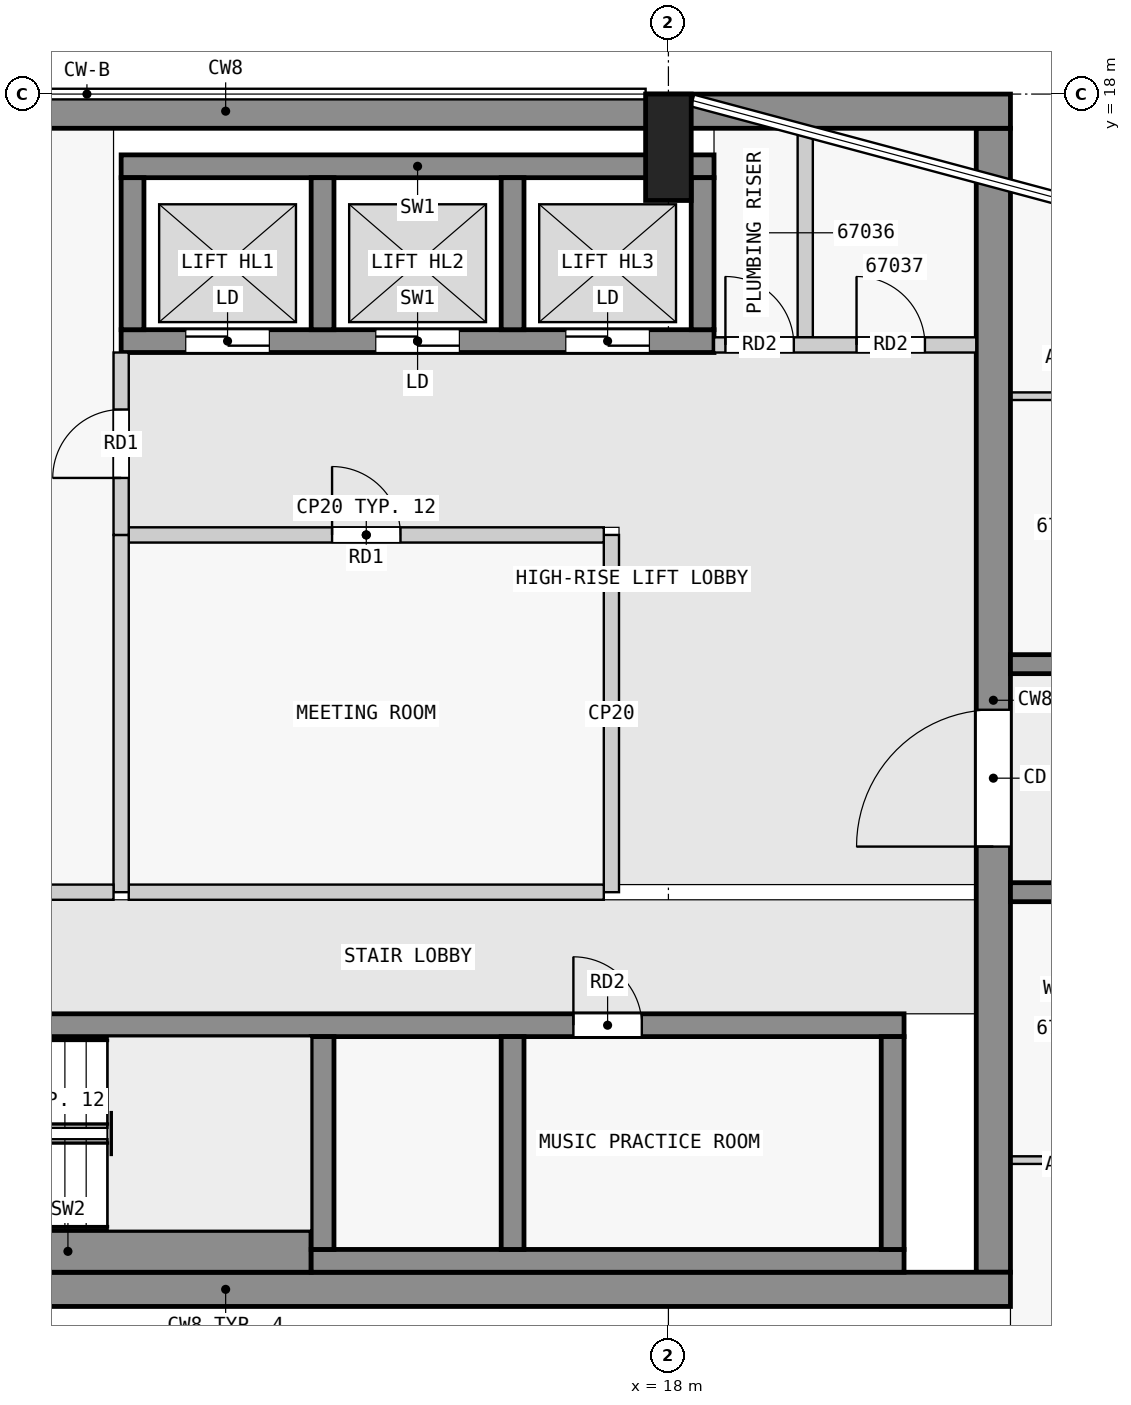
"""IFC4 building model, lengths in metres.
Left out: names, types, materials, properties, quantities, classifications, styles, units other than length and angle.
Written with IfcOpenShell. Run it as: python <this file> out.ifc"""

import sys

from ifc_helpers import new_model, si_unit, direction, frame, frame_2d, origin, origin_2d, place, context, subcontext, project, spatial, rectangle, extrude, element, fill, save


model = new_model("IFC4")
c1 = context("Model", 3, precision=1e-05, world=origin(), true_north=direction((0.0, 1.0)))
c2 = subcontext(c1, "Body", "Model", "MODEL_VIEW")
j1 = project(units=[si_unit("LENGTHUNIT", "METRE"), si_unit("PLANEANGLEUNIT", "RADIAN")], contexts=[c1])
p1 = place(None, origin())
s1 = spatial("IfcSite", under=j1, at=p1, CompositionType="ELEMENT")
p2 = place(p1, origin())
s2 = spatial("IfcBuilding", under=s1, at=p2, CompositionType="ELEMENT")
p3 = place(p2, frame((0.0, 0.0, 256.4)))
s3 = spatial("IfcBuildingStorey", under=s2, at=p3, CompositionType="ELEMENT", Elevation=256.4)
p4 = place(p3, frame((18.0, 17.3, 0.0), z_axis=(0.0, 0.0, 1.0), x_axis=(1.0, 0.0, 0.0)))
e1 = element("IfcColumn", 1, at=p4, inside=s3, PredefinedType="COLUMN", context=c2, shape_type="SweptSolid", body=[
    extrude(rectangle(XDim=0.6, YDim=1.4, at=origin_2d()), origin(), (0.0, 0.0, 1.0), 3.5),
])
for number, where, z_axis, x_axis in (
    (2, (1.85, 2.275, 0.0), (0.0, 0.0, 1.0), (1.0, 0.0, 0.0)),
    (3, (1.85, 17.775, 0.0), (0.0, 0.0, 1.0), (1.0, 0.0, 0.0)),
):
    element("IfcWall", number, at=place(p3, frame(where, z_axis=z_axis, x_axis=x_axis)), inside=s3, PredefinedType="SHEAR", context=c2, shape_type="SweptSolid", body=[
        extrude(rectangle(XDim=20.65, YDim=0.45, at=frame_2d((10.325, 0.0))), origin(), (0.0, 0.0, 1.0), 3.25),
    ])
p5 = place(p3, frame((22.275, 2.5, 0.0), z_axis=(0.0, 0.0, 1.0), x_axis=(0.0, 1.0, 0.0)))
e4 = element("IfcWall", 4, at=p5, inside=s3, PredefinedType="SHEAR", context=c2, shape_type="SweptSolid", body=[
    extrude(rectangle(XDim=15.05, YDim=0.45, at=frame_2d((7.525, 0.0))), origin(), (0.0, 0.0, 1.0), 3.25),
])
p6 = place(p5, frame((5.6, 0.0, 0.0)))
e5 = element("IfcOpeningElement", 5, at=p6, cuts=e4, PredefinedType="OPENING", context=c2, shape_type="SweptSolid", body=[
    extrude(rectangle(XDim=1.8, YDim=2.1, at=frame_2d((0.9, 1.05))), frame((0.0, 0.235, 0.0), z_axis=(0.0, -1.0, 0.0), x_axis=(1.0, 0.0, 0.0)), (0.0, 0.0, 1.0), 0.47),
])
p7 = place(p3, frame((6.9, 2.775, 0.0), z_axis=(0.0, 0.0, 1.0), x_axis=(1.0, 0.0, 0.0)))
e6 = element("IfcWall", 6, at=p7, inside=s3, PredefinedType="SHEAR", context=c2, shape_type="SweptSolid", body=[
    extrude(rectangle(XDim=6.4, YDim=0.55, at=frame_2d((3.2, 0.0))), origin(), (0.0, 0.0, 1.0), 3.25),
])
p8 = place(p3, frame((13.3, 2.65, 0.0), z_axis=(0.0, 0.0, 1.0), x_axis=(1.0, 0.0, 0.0)))
e7 = element("IfcWall", 7, at=p8, inside=s3, PredefinedType="SHEAR", context=c2, shape_type="SweptSolid", body=[
    extrude(rectangle(XDim=7.8, YDim=0.3, at=frame_2d((3.9, 0.0))), origin(), (0.0, 0.0, 1.0), 3.25),
])
for number, where, z_axis, x_axis in (
    (8, (13.45, 2.8, 0.0), (0.0, 0.0, 1.0), (0.0, 1.0, 0.0)),
    (9, (20.95, 2.8, 0.0), (0.0, 0.0, 1.0), (0.0, 1.0, 0.0)),
):
    element("IfcWall", number, at=place(p3, frame(where, z_axis=z_axis, x_axis=x_axis)), inside=s3, PredefinedType="SHEAR", context=c2, shape_type="SweptSolid", body=[
        extrude(rectangle(XDim=2.8, YDim=0.3, at=frame_2d((1.4, 0.0))), origin(), (0.0, 0.0, 1.0), 3.25),
    ])
p9 = place(p3, frame((2.3, 5.75, 0.0), z_axis=(0.0, 0.0, 1.0), x_axis=(1.0, 0.0, 0.0)))
e10 = element("IfcWall", 10, at=p9, inside=s3, PredefinedType="SHEAR", context=c2, shape_type="SweptSolid", body=[
    extrude(rectangle(XDim=18.8, YDim=0.3, at=frame_2d((9.4, 0.0))), origin(), (0.0, 0.0, 1.0), 3.25),
])
p10 = place(p9, frame((4.65, 0.0, 0.0)))
e11 = element("IfcOpeningElement", 11, at=p10, cuts=e10, PredefinedType="OPENING", context=c2, shape_type="SweptSolid", body=[
    extrude(rectangle(XDim=1.1, YDim=2.1, at=frame_2d((0.55, 1.05))), frame((0.0, 0.16, 0.0), z_axis=(0.0, -1.0, 0.0), x_axis=(1.0, 0.0, 0.0)), (0.0, 0.0, 1.0), 0.32),
])
p11 = place(p9, frame((0.45, 0.0, 0.0)))
e12 = element("IfcOpeningElement", 12, at=p11, cuts=e10, PredefinedType="OPENING", context=c2, shape_type="SweptSolid", body=[
    extrude(rectangle(XDim=1.1, YDim=2.1, at=frame_2d((0.55, 1.05))), frame((0.0, 0.16, 0.0), z_axis=(0.0, -1.0, 0.0), x_axis=(1.0, 0.0, 0.0)), (0.0, 0.0, 1.0), 0.32),
])
p12 = place(p9, frame((2.75, 0.0, 0.0)))
e13 = element("IfcOpeningElement", 13, at=p12, cuts=e10, PredefinedType="OPENING", context=c2, shape_type="SweptSolid", body=[
    extrude(rectangle(XDim=1.1, YDim=2.1, at=frame_2d((0.55, 1.05))), frame((0.0, 0.16, 0.0), z_axis=(0.0, -1.0, 0.0), x_axis=(1.0, 0.0, 0.0)), (0.0, 0.0, 1.0), 0.32),
])
p13 = place(p9, frame((14.45, 0.0, 0.0)))
e14 = element("IfcOpeningElement", 14, at=p13, cuts=e10, PredefinedType="OPENING", context=c2, shape_type="SweptSolid", body=[
    extrude(rectangle(XDim=0.9, YDim=2.1, at=frame_2d((0.45, 1.05))), frame((0.0, 0.16, 0.0), z_axis=(0.0, -1.0, 0.0), x_axis=(1.0, 0.0, 0.0)), (0.0, 0.0, 1.0), 0.32),
])
p14 = place(p3, frame((10.8, 17.05, 0.0), z_axis=(0.0, 0.0, 1.0), x_axis=(1.0, 0.0, 0.0)))
e15 = element("IfcWall", 15, at=p14, inside=s3, PredefinedType="SHEAR", context=c2, shape_type="SweptSolid", body=[
    extrude(rectangle(XDim=7.8, YDim=0.3, at=frame_2d((3.9, 0.0))), origin(), (0.0, 0.0, 1.0), 3.25),
])
p15 = place(p3, frame((10.8, 14.75, 0.0), z_axis=(0.0, 0.0, 1.0), x_axis=(1.0, 0.0, 0.0)))
e16 = element("IfcWall", 16, at=p15, inside=s3, PredefinedType="SHEAR", context=c2, shape_type="SweptSolid", body=[
    extrude(rectangle(XDim=7.8, YDim=0.3, at=frame_2d((3.9, 0.0))), origin(), (0.0, 0.0, 1.0), 3.25),
])
p16 = place(p15, frame((0.85, 0.0, 0.0)))
e17 = element("IfcOpeningElement", 17, at=p16, cuts=e16, PredefinedType="OPENING", context=c2, shape_type="SweptSolid", body=[
    extrude(rectangle(XDim=1.1, YDim=2.1, at=frame_2d((0.55, 1.05))), frame((0.0, 0.16, 0.0), z_axis=(0.0, -1.0, 0.0), x_axis=(1.0, 0.0, 0.0)), (0.0, 0.0, 1.0), 0.32),
])
p17 = place(p15, frame((3.35, 0.0, 0.0)))
e18 = element("IfcOpeningElement", 18, at=p17, cuts=e16, PredefinedType="OPENING", context=c2, shape_type="SweptSolid", body=[
    extrude(rectangle(XDim=1.1, YDim=2.1, at=frame_2d((0.55, 1.05))), frame((0.0, 0.16, 0.0), z_axis=(0.0, -1.0, 0.0), x_axis=(1.0, 0.0, 0.0)), (0.0, 0.0, 1.0), 0.32),
])
p18 = place(p15, frame((5.85, 0.0, 0.0)))
e19 = element("IfcOpeningElement", 19, at=p18, cuts=e16, PredefinedType="OPENING", context=c2, shape_type="SweptSolid", body=[
    extrude(rectangle(XDim=1.1, YDim=2.1, at=frame_2d((0.55, 1.05))), frame((0.0, 0.16, 0.0), z_axis=(0.0, -1.0, 0.0), x_axis=(1.0, 0.0, 0.0)), (0.0, 0.0, 1.0), 0.32),
])
for number, where, z_axis, x_axis in (
    (20, (10.95, 14.9, 0.0), (0.0, 0.0, 1.0), (0.0, 1.0, 0.0)),
    (21, (13.45, 14.9, 0.0), (0.0, 0.0, 1.0), (0.0, 1.0, 0.0)),
    (22, (15.95, 14.9, 0.0), (0.0, 0.0, 1.0), (0.0, 1.0, 0.0)),
    (23, (18.45, 14.9, 0.0), (0.0, 0.0, 1.0), (0.0, 1.0, 0.0)),
):
    element("IfcWall", number, at=place(p3, frame(where, z_axis=z_axis, x_axis=x_axis)), inside=s3, PredefinedType="SHEAR", context=c2, shape_type="SweptSolid", body=[
        extrude(rectangle(XDim=2.0, YDim=0.3, at=frame_2d((1.0, 0.0))), origin(), (0.0, 0.0, 1.0), 3.25),
    ])
p19 = place(p3, frame((22.5, 7.5, 0.0), z_axis=(0.0, 0.0, 1.0), x_axis=(1.0, 0.0, 0.0)))
e24 = element("IfcWall", 24, at=p19, inside=s3, PredefinedType="SHEAR", context=c2, shape_type="SweptSolid", body=[
    extrude(rectangle(XDim=22.5, YDim=0.25, at=frame_2d((11.25, 0.0))), origin(), (0.0, 0.0, 1.0), 3.25),
])
p20 = place(p19, frame((1.75, 0.0, 0.0)))
e25 = element("IfcOpeningElement", 25, at=p20, cuts=e24, PredefinedType="OPENING", context=c2, shape_type="SweptSolid", body=[
    extrude(rectangle(XDim=1.0, YDim=2.1, at=frame_2d((0.5, 1.05))), frame((0.0, 0.135, 0.0), z_axis=(0.0, -1.0, 0.0), x_axis=(1.0, 0.0, 0.0)), (0.0, 0.0, 1.0), 0.27),
])
p21 = place(p19, frame((5.85, 0.0, 0.0)))
e26 = element("IfcOpeningElement", 26, at=p21, cuts=e24, PredefinedType="OPENING", context=c2, shape_type="SweptSolid", body=[
    extrude(rectangle(XDim=1.8, YDim=2.1, at=frame_2d((0.9, 1.05))), frame((0.0, 0.135, 0.0), z_axis=(0.0, -1.0, 0.0), x_axis=(1.0, 0.0, 0.0)), (0.0, 0.0, 1.0), 0.27),
])
p22 = place(p19, frame((10.75, 0.0, 0.0)))
e27 = element("IfcOpeningElement", 27, at=p22, cuts=e24, PredefinedType="OPENING", context=c2, shape_type="SweptSolid", body=[
    extrude(rectangle(XDim=1.0, YDim=2.1, at=frame_2d((0.5, 1.05))), frame((0.0, 0.135, 0.0), z_axis=(0.0, -1.0, 0.0), x_axis=(1.0, 0.0, 0.0)), (0.0, 0.0, 1.0), 0.27),
])
p23 = place(p19, frame((15.25, 0.0, 0.0)))
e28 = element("IfcOpeningElement", 28, at=p23, cuts=e24, PredefinedType="OPENING", context=c2, shape_type="SweptSolid", body=[
    extrude(rectangle(XDim=1.0, YDim=2.1, at=frame_2d((0.5, 1.05))), frame((0.0, 0.135, 0.0), z_axis=(0.0, -1.0, 0.0), x_axis=(1.0, 0.0, 0.0)), (0.0, 0.0, 1.0), 0.27),
])
p24 = place(p19, frame((18.75, 0.0, 0.0)))
e29 = element("IfcOpeningElement", 29, at=p24, cuts=e24, PredefinedType="OPENING", context=c2, shape_type="SweptSolid", body=[
    extrude(rectangle(XDim=0.9, YDim=2.1, at=frame_2d((0.45, 1.05))), frame((0.0, 0.135, 0.0), z_axis=(0.0, -1.0, 0.0), x_axis=(1.0, 0.0, 0.0)), (0.0, 0.0, 1.0), 0.27),
])
p25 = place(p19, frame((20.95, 0.0, 0.0)))
e30 = element("IfcOpeningElement", 30, at=p25, cuts=e24, PredefinedType="OPENING", context=c2, shape_type="SweptSolid", body=[
    extrude(rectangle(XDim=1.0, YDim=2.1, at=frame_2d((0.5, 1.05))), frame((0.0, 0.135, 0.0), z_axis=(0.0, -1.0, 0.0), x_axis=(1.0, 0.0, 0.0)), (0.0, 0.0, 1.0), 0.27),
])
p26 = place(p3, frame((22.5, 10.5, 0.0), z_axis=(0.0, 0.0, 1.0), x_axis=(1.0, 0.0, 0.0)))
e31 = element("IfcWall", 31, at=p26, inside=s3, PredefinedType="SHEAR", context=c2, shape_type="SweptSolid", body=[
    extrude(rectangle(XDim=22.5, YDim=0.25, at=frame_2d((11.25, 0.0))), origin(), (0.0, 0.0, 1.0), 3.25),
])
p27 = place(p26, frame((1.75, 0.0, 0.0)))
e32 = element("IfcOpeningElement", 32, at=p27, cuts=e31, PredefinedType="OPENING", context=c2, shape_type="SweptSolid", body=[
    extrude(rectangle(XDim=1.0, YDim=2.1, at=frame_2d((0.5, 1.05))), frame((0.0, 0.135, 0.0), z_axis=(0.0, -1.0, 0.0), x_axis=(1.0, 0.0, 0.0)), (0.0, 0.0, 1.0), 0.27),
])
p28 = place(p26, frame((6.25, 0.0, 0.0)))
e33 = element("IfcOpeningElement", 33, at=p28, cuts=e31, PredefinedType="OPENING", context=c2, shape_type="SweptSolid", body=[
    extrude(rectangle(XDim=1.0, YDim=2.1, at=frame_2d((0.5, 1.05))), frame((0.0, 0.135, 0.0), z_axis=(0.0, -1.0, 0.0), x_axis=(1.0, 0.0, 0.0)), (0.0, 0.0, 1.0), 0.27),
])
p29 = place(p26, frame((10.75, 0.0, 0.0)))
e34 = element("IfcOpeningElement", 34, at=p29, cuts=e31, PredefinedType="OPENING", context=c2, shape_type="SweptSolid", body=[
    extrude(rectangle(XDim=1.0, YDim=2.1, at=frame_2d((0.5, 1.05))), frame((0.0, 0.135, 0.0), z_axis=(0.0, -1.0, 0.0), x_axis=(1.0, 0.0, 0.0)), (0.0, 0.0, 1.0), 0.27),
])
p30 = place(p26, frame((16.85, 0.0, 0.0)))
e35 = element("IfcOpeningElement", 35, at=p30, cuts=e31, PredefinedType="OPENING", context=c2, shape_type="SweptSolid", body=[
    extrude(rectangle(XDim=1.0, YDim=2.1, at=frame_2d((0.5, 1.05))), frame((0.0, 0.135, 0.0), z_axis=(0.0, -1.0, 0.0), x_axis=(1.0, 0.0, 0.0)), (0.0, 0.0, 1.0), 0.27),
])
p31 = place(p3, frame((7.1, 7.5, 0.0), z_axis=(0.0, 0.0, 1.0), x_axis=(1.0, 0.0, 0.0)))
e36 = element("IfcWall", 36, at=p31, inside=s3, PredefinedType="PARTITIONING", context=c2, shape_type="SweptSolid", body=[
    extrude(rectangle(XDim=3.6, YDim=0.2, at=frame_2d((1.8, 0.0))), origin(), (0.0, 0.0, 1.0), 3.25),
])
p32 = place(p3, frame((10.8, 12.2, 0.0), z_axis=(0.0, 0.0, 1.0), x_axis=(0.0, 1.0, 0.0)))
e37 = element("IfcWall", 37, at=p32, inside=s3, PredefinedType="PARTITIONING", context=c2, shape_type="SweptSolid", body=[
    extrude(rectangle(XDim=2.4, YDim=0.2, at=frame_2d((1.2, 0.0))), origin(), (0.0, 0.0, 1.0), 3.25),
])
p33 = place(p32, frame((0.75, 0.0, 0.0)))
e38 = element("IfcOpeningElement", 38, at=p33, cuts=e37, PredefinedType="OPENING", context=c2, shape_type="SweptSolid", body=[
    extrude(rectangle(XDim=0.9, YDim=2.1, at=frame_2d((0.45, 1.05))), frame((0.0, 0.11, 0.0), z_axis=(0.0, -1.0, 0.0), x_axis=(1.0, 0.0, 0.0)), (0.0, 0.0, 1.0), 0.22),
])
p34 = place(p3, frame((10.8, 7.5, 0.0), z_axis=(0.0, 0.0, 1.0), x_axis=(0.0, 1.0, 0.0)))
e39 = element("IfcWall", 39, at=p34, inside=s3, PredefinedType="PARTITIONING", context=c2, shape_type="SweptSolid", body=[
    extrude(rectangle(XDim=4.7, YDim=0.2, at=frame_2d((2.35, 0.0))), origin(), (0.0, 0.0, 1.0), 3.25),
])
p35 = place(p3, frame((10.9, 7.5, 0.0), z_axis=(0.0, 0.0, 1.0), x_axis=(1.0, 0.0, 0.0)))
e40 = element("IfcWall", 40, at=p35, inside=s3, PredefinedType="PARTITIONING", context=c2, shape_type="SweptSolid", body=[
    extrude(rectangle(XDim=6.25, YDim=0.2, at=frame_2d((3.125, 0.0))), origin(), (0.0, 0.0, 1.0), 3.25),
])
p36 = place(p3, frame((17.25, 7.5, 0.0), z_axis=(0.0, 0.0, 1.0), x_axis=(0.0, 1.0, 0.0)))
e41 = element("IfcWall", 41, at=p36, inside=s3, PredefinedType="PARTITIONING", context=c2, shape_type="SweptSolid", body=[
    extrude(rectangle(XDim=4.7, YDim=0.2, at=frame_2d((2.35, 0.0))), origin(), (0.0, 0.0, 1.0), 3.25),
])
p37 = place(p3, frame((10.9, 12.2, 0.0), z_axis=(0.0, 0.0, 1.0), x_axis=(1.0, 0.0, 0.0)))
e42 = element("IfcWall", 42, at=p37, inside=s3, PredefinedType="PARTITIONING", context=c2, shape_type="SweptSolid", body=[
    extrude(rectangle(XDim=6.25, YDim=0.2, at=frame_2d((3.125, 0.0))), origin(), (0.0, 0.0, 1.0), 3.25),
])
p38 = place(p37, frame((2.675, 0.0, 0.0)))
e43 = element("IfcOpeningElement", 43, at=p38, cuts=e42, PredefinedType="OPENING", context=c2, shape_type="SweptSolid", body=[
    extrude(rectangle(XDim=0.9, YDim=2.1, at=frame_2d((0.45, 1.05))), frame((0.0, 0.11, 0.0), z_axis=(0.0, -1.0, 0.0), x_axis=(1.0, 0.0, 0.0)), (0.0, 0.0, 1.0), 0.22),
])
p39 = place(p3, frame((18.6, 14.7, 0.0), z_axis=(0.0, 0.0, 1.0), x_axis=(1.0, 0.0, 0.0)))
e44 = element("IfcWall", 44, at=p39, inside=s3, PredefinedType="PARTITIONING", context=c2, shape_type="SweptSolid", body=[
    extrude(rectangle(XDim=3.45, YDim=0.2, at=frame_2d((1.725, 0.0))), origin(), (0.0, 0.0, 1.0), 3.25),
])
p40 = place(p39, frame((0.15, 0.0, 0.0)))
e45 = element("IfcOpeningElement", 45, at=p40, cuts=e44, PredefinedType="OPENING", context=c2, shape_type="SweptSolid", body=[
    extrude(rectangle(XDim=0.9, YDim=2.1, at=frame_2d((0.45, 1.05))), frame((0.0, 0.11, 0.0), z_axis=(0.0, -1.0, 0.0), x_axis=(1.0, 0.0, 0.0)), (0.0, 0.0, 1.0), 0.22),
])
p41 = place(p39, frame((1.875, 0.0, 0.0)))
e46 = element("IfcOpeningElement", 46, at=p41, cuts=e44, PredefinedType="OPENING", context=c2, shape_type="SweptSolid", body=[
    extrude(rectangle(XDim=0.9, YDim=2.1, at=frame_2d((0.45, 1.05))), frame((0.0, 0.11, 0.0), z_axis=(0.0, -1.0, 0.0), x_axis=(1.0, 0.0, 0.0)), (0.0, 0.0, 1.0), 0.22),
])
p42 = place(p3, frame((19.8, 14.8, 0.0), z_axis=(0.0, 0.0, 1.0), x_axis=(0.0, 1.0, 0.0)))
e47 = element("IfcWall", 47, at=p42, inside=s3, PredefinedType="PARTITIONING", context=c2, shape_type="SweptSolid", body=[
    extrude(rectangle(XDim=2.75, YDim=0.2, at=frame_2d((1.375, 0.0))), origin(), (0.0, 0.0, 1.0), 3.25),
])
for number, where, z_axis, x_axis in (
    (48, (22.5, 3.975, 0.0), (0.0, 0.0, 1.0), (1.0, 0.0, 0.0)),
    (49, (23.95, 14.025, 0.0), (0.0, 0.0, 1.0), (-1.0, 0.0, 0.0)),
):
    element("IfcWall", number, at=place(p3, frame(where, z_axis=z_axis, x_axis=x_axis)), inside=s3, PredefinedType="PARTITIONING", context=c2, shape_type="SweptSolid", body=[
        extrude(rectangle(XDim=1.45, YDim=0.1, at=frame_2d((0.725, 0.0))), origin(), (0.0, 0.0, 1.0), 3.25),
    ])
p43 = place(p3, frame((15.95, 2.8, 0.0), z_axis=(0.0, 0.0, 1.0), x_axis=(0.0, 1.0, 0.0)))
e50 = element("IfcWall", 50, at=p43, inside=s3, PredefinedType="SHEAR", context=c2, shape_type="SweptSolid", body=[
    extrude(rectangle(XDim=2.8, YDim=0.3, at=frame_2d((1.4, 0.0))), origin(), (0.0, 0.0, 1.0), 3.25),
])
p44 = place(p33, origin())
e51 = element("IfcDoor", 51, at=p44, inside=s3, OperationType="SINGLE_SWING_LEFT", PredefinedType="DOOR", context=c2, shape_type="SweptSolid", body=[
    extrude(rectangle(XDim=0.9, YDim=2.1, at=frame_2d((0.45, 1.05))), frame((0.0, 0.025, 0.0), z_axis=(0.0, -1.0, 0.0), x_axis=(1.0, 0.0, 0.0)), (0.0, 0.0, 1.0), 0.05),
])
fill(e38, e51)
p45 = place(p38, origin())
e52 = element("IfcDoor", 52, at=p45, inside=s3, OperationType="SINGLE_SWING_LEFT", PredefinedType="DOOR", context=c2, shape_type="SweptSolid", body=[
    extrude(rectangle(XDim=0.9, YDim=2.1, at=frame_2d((0.45, 1.05))), frame((0.0, 0.025, 0.0), z_axis=(0.0, -1.0, 0.0), x_axis=(1.0, 0.0, 0.0)), (0.0, 0.0, 1.0), 0.05),
])
fill(e43, e52)
p46 = place(p16, origin())
e53 = element("IfcDoor", 53, at=p46, inside=s3, OperationType="DOUBLE_DOOR_SLIDING", PredefinedType="DOOR", context=c2, shape_type="SweptSolid", body=[
    extrude(rectangle(XDim=1.1, YDim=2.1, at=frame_2d((0.55, 1.05))), frame((0.0, 0.025, 0.0), z_axis=(0.0, -1.0, 0.0), x_axis=(1.0, 0.0, 0.0)), (0.0, 0.0, 1.0), 0.05),
])
fill(e17, e53)
p47 = place(p17, origin())
e54 = element("IfcDoor", 54, at=p47, inside=s3, OperationType="DOUBLE_DOOR_SLIDING", PredefinedType="DOOR", context=c2, shape_type="SweptSolid", body=[
    extrude(rectangle(XDim=1.1, YDim=2.1, at=frame_2d((0.55, 1.05))), frame((0.0, 0.025, 0.0), z_axis=(0.0, -1.0, 0.0), x_axis=(1.0, 0.0, 0.0)), (0.0, 0.0, 1.0), 0.05),
])
fill(e18, e54)
p48 = place(p18, origin())
e55 = element("IfcDoor", 55, at=p48, inside=s3, OperationType="DOUBLE_DOOR_SLIDING", PredefinedType="DOOR", context=c2, shape_type="SweptSolid", body=[
    extrude(rectangle(XDim=1.1, YDim=2.1, at=frame_2d((0.55, 1.05))), frame((0.0, 0.025, 0.0), z_axis=(0.0, -1.0, 0.0), x_axis=(1.0, 0.0, 0.0)), (0.0, 0.0, 1.0), 0.05),
])
fill(e19, e55)
p49 = place(p6, origin())
e56 = element("IfcDoor", 56, at=p49, inside=s3, OperationType="DOUBLE_DOOR_SINGLE_SWING", PredefinedType="DOOR", context=c2, shape_type="SweptSolid", body=[
    extrude(rectangle(XDim=1.8, YDim=2.1, at=frame_2d((0.9, 1.05))), frame((0.0, 0.025, 0.0), z_axis=(0.0, -1.0, 0.0), x_axis=(1.0, 0.0, 0.0)), (0.0, 0.0, 1.0), 0.05),
])
fill(e5, e56)
p50 = place(p40, origin())
e57 = element("IfcDoor", 57, at=p50, inside=s3, OperationType="SINGLE_SWING_LEFT", PredefinedType="DOOR", context=c2, shape_type="SweptSolid", body=[
    extrude(rectangle(XDim=0.9, YDim=2.1, at=frame_2d((0.45, 1.05))), frame((0.0, 0.025, 0.0), z_axis=(0.0, -1.0, 0.0), x_axis=(1.0, 0.0, 0.0)), (0.0, 0.0, 1.0), 0.05),
])
fill(e45, e57)
p51 = place(p41, origin())
e58 = element("IfcDoor", 58, at=p51, inside=s3, OperationType="SINGLE_SWING_LEFT", PredefinedType="DOOR", context=c2, shape_type="SweptSolid", body=[
    extrude(rectangle(XDim=0.9, YDim=2.1, at=frame_2d((0.45, 1.05))), frame((0.0, 0.025, 0.0), z_axis=(0.0, -1.0, 0.0), x_axis=(1.0, 0.0, 0.0)), (0.0, 0.0, 1.0), 0.05),
])
fill(e46, e58)
p52 = place(p13, origin())
e59 = element("IfcDoor", 59, at=p52, inside=s3, OperationType="SINGLE_SWING_LEFT", PredefinedType="DOOR", context=c2, shape_type="SweptSolid", body=[
    extrude(rectangle(XDim=0.9, YDim=2.1, at=frame_2d((0.45, 1.05))), frame((0.0, 0.025, 0.0), z_axis=(0.0, -1.0, 0.0), x_axis=(1.0, 0.0, 0.0)), (0.0, 0.0, 1.0), 0.05),
])
fill(e14, e59)
save(model, sys.argv[1])
